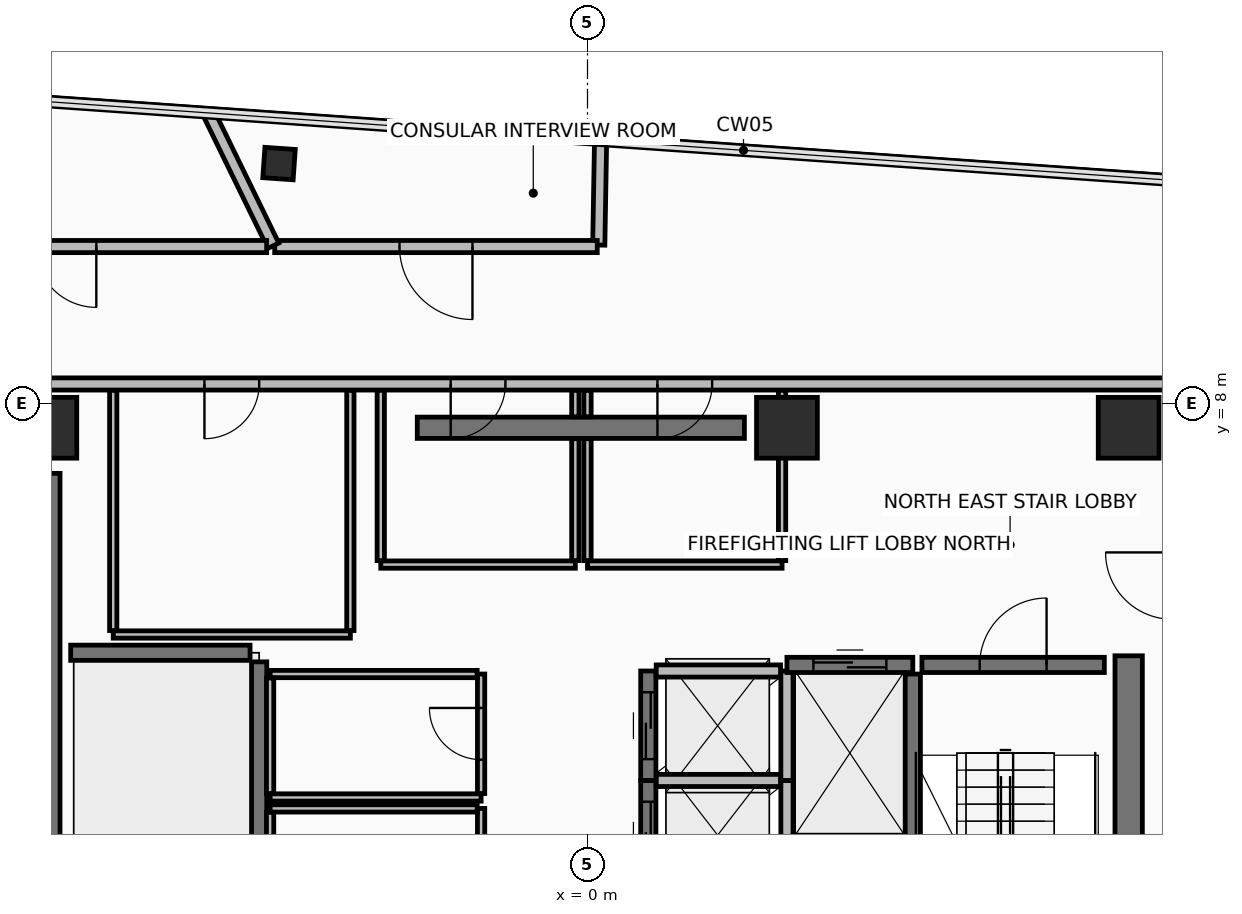
"""IFC4 building model, lengths in metres.
Left out: names, types, materials, properties, quantities, classifications, styles, units other than length and angle.
Written with IfcOpenShell. Run it as: python <this file> out.ifc"""

import sys

from ifc_helpers import new_model, si_unit, direction, frame, frame_2d, origin, origin_2d, place, context, subcontext, project, spatial, rectangle, hollow_rectangle, extrude, element, fill, save


model = new_model("IFC4")
c1 = context("Model", 3, precision=1e-05, world=origin(), true_north=direction((0.0, 1.0)))
c2 = subcontext(c1, "Body", "Model", "MODEL_VIEW")
j1 = project(units=[si_unit("LENGTHUNIT", "METRE"), si_unit("PLANEANGLEUNIT", "RADIAN")], contexts=[c1])
p1 = place(None, origin())
s1 = spatial("IfcSite", under=j1, at=p1, CompositionType="ELEMENT")
p2 = place(p1, origin())
s2 = spatial("IfcBuilding", under=s1, at=p2, CompositionType="ELEMENT")
p3 = place(p2, frame((0.0, 0.0, 227.05)))
s3 = spatial("IfcBuildingStorey", under=s2, at=p3, CompositionType="ELEMENT", Elevation=227.05)
for number, where, z_axis, x_axis in (
    (1, (8.9, 7.6, 0.0), (0.0, 0.0, 1.0), (1.0, 0.0, 0.0)),
    (2, (3.28, 7.6, 0.0), (0.0, 0.0, 1.0), (1.0, 0.0, 0.0)),
    (3, (-8.9, 7.6, 0.0), (0.0, 0.0, 1.0), (1.0, 0.0, 0.0)),
):
    element("IfcColumn", number, at=place(p3, frame(where, z_axis=z_axis, x_axis=x_axis)), inside=s3, PredefinedType="COLUMN", context=c2, shape_type="SweptSolid", body=[
        extrude(rectangle(XDim=1.0, YDim=1.0, at=origin_2d()), origin(), (0.0, 0.0, 1.0), 3.6),
    ])
p4 = place(p3, frame((-5.073, 11.945, 0.0), z_axis=(0.0, 0.0, 1.0), x_axis=(-0.99756405026, 0.069756473744, 0.0)))
e4 = element("IfcColumn", 4, at=p4, inside=s3, PredefinedType="COLUMN", context=c2, shape_type="SweptSolid", body=[
    extrude(hollow_rectangle(XDim=0.5, YDim=0.5, WallThickness=0.032, at=origin_2d()), origin(), (0.0, 0.0, 1.0), 3.6),
])
p5 = place(p3, frame((-2.8, 7.6, 0.0), z_axis=(0.0, 0.0, 1.0), x_axis=(1.0, 0.0, 0.0)))
e5 = element("IfcWall", 5, at=p5, inside=s3, PredefinedType="SHEAR", context=c2, shape_type="SweptSolid", body=[
    extrude(rectangle(XDim=5.38, YDim=0.35, at=frame_2d((2.69, 0.0))), origin(), (0.0, 0.0, 1.0), 3.42),
])
for number, where, z_axis, x_axis in (
    (6, (-8.9, -3.85, 0.0), (0.0, 0.0, 1.0), (0.0, 1.0, 0.0)),
    (7, (8.9, -6.85, 0.0), (0.0, 0.0, 1.0), (0.0, 1.0, 0.0)),
):
    element("IfcWall", number, at=place(p3, frame(where, z_axis=z_axis, x_axis=x_axis)), inside=s3, PredefinedType="SHEAR", context=c2, shape_type="SweptSolid", body=[
        extrude(rectangle(XDim=10.7, YDim=0.45, at=frame_2d((5.35, 0.0))), origin(), (0.0, 0.0, 1.0), 3.42),
    ])
p6 = place(p3, frame((9.62, 8.32, 0.0), z_axis=(0.0, 0.0, 1.0), x_axis=(-1.0, 0.0, 0.0)))
e8 = element("IfcWall", 8, at=p6, inside=s3, PredefinedType="PARTITIONING", context=c2, shape_type="SweptSolid", body=[
    extrude(rectangle(XDim=19.24, YDim=0.2, at=frame_2d((9.62, 0.0))), origin(), (0.0, 0.0, 1.0), 2.915),
])
p7 = place(p6, frame((10.97, 0.0, 0.0)))
e9 = element("IfcOpeningElement", 9, at=p7, cuts=e8, PredefinedType="OPENING", context=c2, shape_type="SweptSolid", body=[
    extrude(rectangle(XDim=0.9, YDim=2.1, at=frame_2d((0.45, 1.05))), frame((0.0, 0.11, 0.0), z_axis=(0.0, -1.0, 0.0), x_axis=(1.0, 0.0, 0.0)), (0.0, 0.0, 1.0), 0.22),
])
p8 = place(p6, frame((7.57, 0.0, 0.0)))
e10 = element("IfcOpeningElement", 10, at=p8, cuts=e8, PredefinedType="OPENING", context=c2, shape_type="SweptSolid", body=[
    extrude(rectangle(XDim=0.9, YDim=2.1, at=frame_2d((0.45, 1.05))), frame((0.0, 0.11, 0.0), z_axis=(0.0, -1.0, 0.0), x_axis=(1.0, 0.0, 0.0)), (0.0, 0.0, 1.0), 0.22),
])
p9 = place(p6, frame((15.02, 0.0, 0.0)))
e11 = element("IfcOpeningElement", 11, at=p9, cuts=e8, PredefinedType="OPENING", context=c2, shape_type="SweptSolid", body=[
    extrude(rectangle(XDim=0.9, YDim=2.1, at=frame_2d((0.45, 1.05))), frame((0.0, 0.11, 0.0), z_axis=(0.0, -1.0, 0.0), x_axis=(1.0, 0.0, 0.0)), (0.0, 0.0, 1.0), 0.22),
])
p10 = place(p3, frame((-5.4, -3.55, 0.0), z_axis=(0.0, 0.0, 1.0), x_axis=(0.0, 1.0, 0.0)))
e12 = element("IfcWall", 12, at=p10, inside=s3, PredefinedType="SHEAR", context=c2, shape_type="SweptSolid", body=[
    extrude(rectangle(XDim=7.3, YDim=0.25, at=frame_2d((3.65, 0.0))), origin(), (0.0, 0.0, 1.0), 3.42),
])
p11 = place(p3, frame((-8.5, 3.9, 0.0), z_axis=(0.0, 0.0, 1.0), x_axis=(1.0, 0.0, 0.0)))
e13 = element("IfcWall", 13, at=p11, inside=s3, PredefinedType="SHEAR", context=c2, shape_type="SweptSolid", body=[
    extrude(rectangle(XDim=2.95, YDim=0.25, at=frame_2d((1.475, 0.0))), origin(), (0.0, 0.0, 1.0), 3.42),
])
p12 = place(p3, frame((5.35, -3.75, 0.0), z_axis=(0.0, 0.0, 1.0), x_axis=(0.0, 1.0, 0.0)))
e14 = element("IfcWall", 14, at=p12, inside=s3, PredefinedType="SHEAR", context=c2, shape_type="SweptSolid", body=[
    extrude(rectangle(XDim=7.3, YDim=0.25, at=frame_2d((3.65, 0.0))), origin(), (0.0, 0.0, 1.0), 3.42),
])
p13 = place(p3, frame((5.5, 3.7, 0.0), z_axis=(0.0, 0.0, 1.0), x_axis=(1.0, 0.0, 0.0)))
e15 = element("IfcWall", 15, at=p13, inside=s3, PredefinedType="SHEAR", context=c2, shape_type="SweptSolid", body=[
    extrude(rectangle(XDim=3.0, YDim=0.25, at=frame_2d((1.5, 0.0))), origin(), (0.0, 0.0, 1.0), 3.42),
])
p14 = place(p13, frame((0.95, 0.0, 0.0)))
e16 = element("IfcOpeningElement", 16, at=p14, cuts=e15, PredefinedType="OPENING", context=c2, shape_type="SweptSolid", body=[
    extrude(rectangle(XDim=1.1, YDim=2.15, at=frame_2d((0.55, 1.075))), frame((0.0, 0.135, 0.0), z_axis=(0.0, -1.0, 0.0), x_axis=(1.0, 0.0, 0.0)), (0.0, 0.0, 1.0), 0.27),
])
p15 = place(p3, frame((1.0, 0.0, 0.0), z_axis=(0.0, 0.0, 1.0), x_axis=(0.0, 1.0, 0.0)))
e17 = element("IfcWall", 17, at=p15, inside=s3, PredefinedType="SHEAR", context=c2, shape_type="SweptSolid", body=[
    extrude(rectangle(XDim=1.8, YDim=0.25, at=frame_2d((0.9, 0.0))), origin(), (0.0, 0.0, 1.0), 3.42),
])
p16 = place(p15, frame((0.35, 0.0, 0.0)))
e18 = element("IfcOpeningElement", 18, at=p16, cuts=e17, PredefinedType="OPENING", context=c2, shape_type="SweptSolid", body=[
    extrude(rectangle(XDim=1.1, YDim=2.2, at=frame_2d((0.55, 1.1))), frame((0.0, 0.135, 0.0), z_axis=(0.0, -1.0, 0.0), x_axis=(1.0, 0.0, 0.0)), (0.0, 0.0, 1.0), 0.27),
])
p17 = place(p3, frame((3.28, 0.0, 0.0), z_axis=(0.0, 0.0, 1.0), x_axis=(0.0, 1.0, 0.0)))
e19 = element("IfcWall", 19, at=p17, inside=s3, PredefinedType="PARTITIONING", context=c2, shape_type="SweptSolid", body=[
    extrude(rectangle(XDim=1.8, YDim=0.2, at=frame_2d((0.9, 0.0))), origin(), (0.0, 0.0, 1.0), 3.42),
])
p18 = place(p3, frame((1.13, 1.8, 0.0), z_axis=(0.0, 0.0, 1.0), x_axis=(1.0, 0.0, 0.0)))
e20 = element("IfcWall", 20, at=p18, inside=s3, PredefinedType="PARTITIONING", context=c2, shape_type="SweptSolid", body=[
    extrude(rectangle(XDim=2.045, YDim=0.2, at=frame_2d((1.022, 0.0))), origin(), (0.0, 0.0, 1.0), 3.42),
])
p19 = place(p3, frame((1.0, 1.8, 0.0), z_axis=(0.0, 0.0, 1.0), x_axis=(0.0, 1.0, 0.0)))
e21 = element("IfcWall", 21, at=p19, inside=s3, PredefinedType="SHEAR", context=c2, shape_type="SweptSolid", body=[
    extrude(rectangle(XDim=1.8, YDim=0.25, at=frame_2d((0.9, 0.0))), origin(), (0.0, 0.0, 1.0), 3.42),
])
p20 = place(p19, frame((0.35, 0.0, 0.0)))
e22 = element("IfcOpeningElement", 22, at=p20, cuts=e21, PredefinedType="OPENING", context=c2, shape_type="SweptSolid", body=[
    extrude(rectangle(XDim=1.1, YDim=2.2, at=frame_2d((0.55, 1.1))), frame((0.0, 0.135, 0.0), z_axis=(0.0, -1.0, 0.0), x_axis=(1.0, 0.0, 0.0)), (0.0, 0.0, 1.0), 0.27),
])
p21 = place(p3, frame((3.28, 1.8, 0.0), z_axis=(0.0, 0.0, 1.0), x_axis=(0.0, 1.0, 0.0)))
e23 = element("IfcWall", 23, at=p21, inside=s3, PredefinedType="PARTITIONING", context=c2, shape_type="SweptSolid", body=[
    extrude(rectangle(XDim=1.8, YDim=0.2, at=frame_2d((0.9, 0.0))), origin(), (0.0, 0.0, 1.0), 3.42),
])
p22 = place(p3, frame((1.13, 3.6, 0.0), z_axis=(0.0, 0.0, 1.0), x_axis=(1.0, 0.0, 0.0)))
e24 = element("IfcWall", 24, at=p22, inside=s3, PredefinedType="PARTITIONING", context=c2, shape_type="SweptSolid", body=[
    extrude(rectangle(XDim=2.045, YDim=0.2, at=frame_2d((1.022, 0.0))), origin(), (0.0, 0.0, 1.0), 2.715),
])
p23 = place(p3, frame((3.28, 3.7, 0.0), z_axis=(0.0, 0.0, 1.0), x_axis=(1.0, 0.0, 0.0)))
e25 = element("IfcWall", 25, at=p23, inside=s3, PredefinedType="SHEAR", context=c2, shape_type="SweptSolid", body=[
    extrude(rectangle(XDim=2.07, YDim=0.25, at=frame_2d((1.035, 0.0))), origin(), (0.0, 0.0, 1.0), 3.42),
])
p24 = place(p23, frame((0.435, 0.0, 0.0)))
e26 = element("IfcOpeningElement", 26, at=p24, cuts=e25, PredefinedType="OPENING", context=c2, shape_type="SweptSolid", body=[
    extrude(rectangle(XDim=1.2, YDim=2.2, at=frame_2d((0.6, 1.1))), frame((0.0, 0.135, 0.0), z_axis=(0.0, -1.0, 0.0), x_axis=(1.0, 0.0, 0.0)), (0.0, 0.0, 1.0), 0.27),
])
p25 = place(p3, frame((-5.22, 1.52, 0.0), z_axis=(0.0, 0.0, 1.0), x_axis=(1.0, 0.0, 0.0)))
e27 = element("IfcWall", 27, at=p25, inside=s3, PredefinedType="PARTITIONING", context=c2, shape_type="SweptSolid", body=[
    extrude(rectangle(XDim=3.47, YDim=0.12, at=frame_2d((1.735, 0.0))), origin(), (0.0, 0.0, 1.0), 3.42),
])
p26 = place(p3, frame((-1.75, 1.585, 0.0), z_axis=(0.0, 0.0, 1.0), x_axis=(0.0, 1.0, 0.0)))
e28 = element("IfcWall", 28, at=p26, inside=s3, PredefinedType="PARTITIONING", context=c2, shape_type="SweptSolid", body=[
    extrude(rectangle(XDim=1.965, YDim=0.12, at=frame_2d((0.982, 0.0))), origin(), (0.0, 0.0, 1.0), 3.42),
])
p27 = place(p26, frame((0.557, 0.0, 0.0)))
e29 = element("IfcOpeningElement", 29, at=p27, cuts=e28, PredefinedType="OPENING", context=c2, shape_type="SweptSolid", body=[
    extrude(rectangle(XDim=0.85, YDim=2.1, at=frame_2d((0.425, 1.05))), frame((0.0, 0.07, 0.0), z_axis=(0.0, -1.0, 0.0), x_axis=(1.0, 0.0, 0.0)), (0.0, 0.0, 1.0), 0.14),
])
p28 = place(p3, frame((-1.815, 3.55, 0.0), z_axis=(0.0, 0.0, 1.0), x_axis=(-1.0, 0.0, 0.0)))
e30 = element("IfcWall", 30, at=p28, inside=s3, PredefinedType="PARTITIONING", context=c2, shape_type="SweptSolid", body=[
    extrude(rectangle(XDim=3.405, YDim=0.12, at=frame_2d((1.703, 0.0))), origin(), (0.0, 0.0, 1.0), 3.42),
])
p29 = place(p3, frame((-5.22, 3.485, 0.0), z_axis=(0.0, 0.0, 1.0), x_axis=(0.0, -1.0, 0.0)))
e31 = element("IfcWall", 31, at=p29, inside=s3, PredefinedType="PARTITIONING", context=c2, shape_type="SweptSolid", body=[
    extrude(rectangle(XDim=1.9, YDim=0.12, at=frame_2d((0.95, 0.0))), origin(), (0.0, 0.0, 1.0), 3.42),
])
p30 = place(p3, frame((-1.75, -0.485, 0.0), z_axis=(0.0, 0.0, 1.0), x_axis=(0.0, 1.0, 0.0)))
e32 = element("IfcWall", 32, at=p30, inside=s3, PredefinedType="PARTITIONING", context=c2, shape_type="SweptSolid", body=[
    extrude(rectangle(XDim=1.825, YDim=0.12, at=frame_2d((0.913, 0.0))), origin(), (0.0, 0.0, 1.0), 3.42),
])
p31 = place(p30, frame((0.488, 0.0, 0.0)))
e33 = element("IfcOpeningElement", 33, at=p31, cuts=e32, PredefinedType="OPENING", context=c2, shape_type="SweptSolid", body=[
    extrude(rectangle(XDim=0.85, YDim=2.1, at=frame_2d((0.425, 1.05))), frame((0.0, 0.07, 0.0), z_axis=(0.0, -1.0, 0.0), x_axis=(1.0, 0.0, 0.0)), (0.0, 0.0, 1.0), 0.14),
])
p32 = place(p3, frame((-1.815, 1.34, 0.0), z_axis=(0.0, 0.0, 1.0), x_axis=(-1.0, 0.0, 0.0)))
e34 = element("IfcWall", 34, at=p32, inside=s3, PredefinedType="PARTITIONING", context=c2, shape_type="SweptSolid", body=[
    extrude(rectangle(XDim=3.405, YDim=0.12, at=frame_2d((1.703, 0.0))), origin(), (0.0, 0.0, 1.0), 3.42),
])
p33 = place(p3, frame((-5.22, 1.275, 0.0), z_axis=(0.0, 0.0, 1.0), x_axis=(0.0, -1.0, 0.0)))
e35 = element("IfcWall", 35, at=p33, inside=s3, PredefinedType="PARTITIONING", context=c2, shape_type="SweptSolid", body=[
    extrude(rectangle(XDim=1.76, YDim=0.12, at=frame_2d((0.88, 0.0))), origin(), (0.0, 0.0, 1.0), 3.42),
])
p34 = place(p3, frame((-3.4, 5.35, 0.0), z_axis=(0.0, 0.0, 1.0), x_axis=(1.0, 0.0, 0.0)))
e36 = element("IfcWall", 36, at=p34, inside=s3, PredefinedType="PARTITIONING", context=c2, shape_type="SweptSolid", body=[
    extrude(rectangle(XDim=3.2, YDim=0.12, at=frame_2d((1.6, 0.0))), origin(), (0.0, 0.0, 1.0), 3.42),
])
p35 = place(p3, frame((-0.2, 5.415, 0.0), z_axis=(0.0, 0.0, 1.0), x_axis=(0.0, 1.0, 0.0)))
e37 = element("IfcWall", 37, at=p35, inside=s3, PredefinedType="PARTITIONING", context=c2, shape_type="SweptSolid", body=[
    extrude(rectangle(XDim=2.005, YDim=0.12, at=frame_2d((1.002, 0.0))), origin(), (0.0, 0.0, 1.0), 2.715),
])
p36 = place(p3, frame((-0.2, 7.78, 0.0), z_axis=(0.0, 0.0, 1.0), x_axis=(0.0, 1.0, 0.0)))
e38 = element("IfcWall", 38, at=p36, inside=s3, PredefinedType="PARTITIONING", context=c2, shape_type="SweptSolid", body=[
    extrude(rectangle(XDim=0.435, YDim=0.12, at=frame_2d((0.218, 0.0))), origin(), (0.0, 0.0, 1.0), 2.715),
])
p37 = place(p3, frame((-3.4, 8.215, 0.0), z_axis=(0.0, 0.0, 1.0), x_axis=(0.0, -1.0, 0.0)))
e39 = element("IfcWall", 39, at=p37, inside=s3, PredefinedType="PARTITIONING", context=c2, shape_type="SweptSolid", body=[
    extrude(rectangle(XDim=2.8, YDim=0.12, at=frame_2d((1.4, 0.0))), origin(), (0.0, 0.0, 1.0), 2.715),
])
p38 = place(p3, frame((0.0, 5.35, 0.0), z_axis=(0.0, 0.0, 1.0), x_axis=(1.0, 0.0, 0.0)))
e40 = element("IfcWall", 40, at=p38, inside=s3, PredefinedType="PARTITIONING", context=c2, shape_type="SweptSolid", body=[
    extrude(rectangle(XDim=3.2, YDim=0.12, at=frame_2d((1.6, 0.0))), origin(), (0.0, 0.0, 1.0), 2.715),
])
p39 = place(p3, frame((3.2, 5.415, 0.0), z_axis=(0.0, 0.0, 1.0), x_axis=(0.0, 1.0, 0.0)))
e41 = element("IfcWall", 41, at=p39, inside=s3, PredefinedType="PARTITIONING", context=c2, shape_type="SweptSolid", body=[
    extrude(rectangle(XDim=2.8, YDim=0.12, at=frame_2d((1.4, 0.0))), origin(), (0.0, 0.0, 1.0), 2.715),
])
p40 = place(p3, frame((0.0, 8.215, 0.0), z_axis=(0.0, 0.0, 1.0), x_axis=(0.0, -1.0, 0.0)))
e42 = element("IfcWall", 42, at=p40, inside=s3, PredefinedType="PARTITIONING", context=c2, shape_type="SweptSolid", body=[
    extrude(rectangle(XDim=0.435, YDim=0.12, at=frame_2d((0.218, 0.0))), origin(), (0.0, 0.0, 1.0), 2.715),
])
p41 = place(p3, frame((0.0, 7.42, 0.0), z_axis=(0.0, 0.0, 1.0), x_axis=(0.0, -1.0, 0.0)))
e43 = element("IfcWall", 43, at=p41, inside=s3, PredefinedType="PARTITIONING", context=c2, shape_type="SweptSolid", body=[
    extrude(rectangle(XDim=2.005, YDim=0.12, at=frame_2d((1.002, 0.0))), origin(), (0.0, 0.0, 1.0), 2.715),
])
p42 = place(p3, frame((-7.8, 4.2, 0.0), z_axis=(0.0, 0.0, 1.0), x_axis=(1.0, 0.0, 0.0)))
e44 = element("IfcWall", 44, at=p42, inside=s3, PredefinedType="PARTITIONING", context=c2, shape_type="SweptSolid", body=[
    extrude(rectangle(XDim=3.9, YDim=0.12, at=frame_2d((1.95, 0.0))), origin(), (0.0, 0.0, 1.0), 3.42),
])
for number, where, z_axis, x_axis in (
    (45, (-3.9, 4.265, 0.0), (0.0, 0.0, 1.0), (0.0, 1.0, 0.0)),
    (46, (-7.8, 8.215, 0.0), (0.0, 0.0, 1.0), (0.0, -1.0, 0.0)),
):
    element("IfcWall", number, at=place(p3, frame(where, z_axis=z_axis, x_axis=x_axis)), inside=s3, PredefinedType="PARTITIONING", context=c2, shape_type="SweptSolid", body=[
        extrude(rectangle(XDim=3.95, YDim=0.12, at=frame_2d((1.975, 0.0))), origin(), (0.0, 0.0, 1.0), 2.715),
    ])
p43 = place(p3, frame((0.215, 12.303, 0.0), z_axis=(0.0, 0.0, 1.0), x_axis=(-0.017389924227, -0.999848783835, 0.0)))
e47 = element("IfcWall", 47, at=p43, inside=s3, PredefinedType="PARTITIONING", context=c2, shape_type="SweptSolid", body=[
    extrude(rectangle(XDim=1.699, YDim=0.2, at=frame_2d((0.849, 0.0))), origin(), (0.0, 0.0, 1.0), 2.765),
])
p44 = place(p3, frame((0.16, 10.58, 0.0), z_axis=(0.0, 0.0, 1.0), x_axis=(-1.0, 0.0, 0.0)))
e48 = element("IfcWall", 48, at=p44, inside=s3, PredefinedType="PARTITIONING", context=c2, shape_type="SweptSolid", body=[
    extrude(rectangle(XDim=5.305, YDim=0.2, at=frame_2d((2.652, 0.0))), origin(), (0.0, 0.0, 1.0), 3.42),
])
p45 = place(p44, frame((2.052, 0.0, 0.0)))
e49 = element("IfcOpeningElement", 49, at=p45, cuts=e48, PredefinedType="OPENING", context=c2, shape_type="SweptSolid", body=[
    extrude(rectangle(XDim=1.2, YDim=2.15, at=frame_2d((0.6, 1.075))), frame((0.0, 0.11, 0.0), z_axis=(0.0, -1.0, 0.0), x_axis=(1.0, 0.0, 0.0)), (0.0, 0.0, 1.0), 0.22),
])
p46 = place(p3, frame((-5.167, 10.594, 0.0), z_axis=(0.0, 0.0, 1.0), x_axis=(-0.43834839389, 0.898805143273, 0.0)))
e50 = element("IfcWall", 50, at=p46, inside=s3, PredefinedType="PARTITIONING", context=c2, shape_type="SweptSolid", body=[
    extrude(rectangle(XDim=2.429, YDim=0.2, at=frame_2d((1.215, 0.0))), origin(), (0.0, 0.0, 1.0), 2.765),
])
p47 = place(p3, frame((-5.277, 10.58, 0.0), z_axis=(0.0, 0.0, 1.0), x_axis=(-1.0, 0.0, 0.0)))
e51 = element("IfcWall", 51, at=p47, inside=s3, PredefinedType="PARTITIONING", context=c2, shape_type="SweptSolid", body=[
    extrude(rectangle(XDim=6.602, YDim=0.2, at=frame_2d((3.301, 0.0))), origin(), (0.0, 0.0, 1.0), 2.915),
])
p48 = place(p47, frame((2.801, 0.0, 0.0)))
e52 = element("IfcOpeningElement", 52, at=p48, cuts=e51, PredefinedType="OPENING", context=c2, shape_type="SweptSolid", body=[
    extrude(rectangle(XDim=1.0, YDim=2.15, at=frame_2d((0.5, 1.075))), frame((0.0, 0.11, 0.0), z_axis=(0.0, -1.0, 0.0), x_axis=(1.0, 0.0, 0.0)), (0.0, 0.0, 1.0), 0.22),
])
p49 = place(p14, frame((1.1, 0.0, 0.0), z_axis=(0.0, 0.0, 1.0), x_axis=(-1.0, 0.0, 0.0)))
e53 = element("IfcDoor", 53, at=p49, inside=s3, OperationType="SINGLE_SWING_LEFT", PredefinedType="DOOR", context=c2, shape_type="SweptSolid", body=[
    extrude(rectangle(XDim=1.1, YDim=2.15, at=frame_2d((0.55, 1.075))), frame((0.0, 0.025, 0.0), z_axis=(0.0, -1.0, 0.0), x_axis=(1.0, 0.0, 0.0)), (0.0, 0.0, 1.0), 0.05),
])
fill(e16, e53)
p50 = place(p16, origin())
e54 = element("IfcDoor", 54, at=p50, inside=s3, OperationType="SLIDING_TO_LEFT", PredefinedType="DOOR", context=c2, shape_type="SweptSolid", body=[
    extrude(rectangle(XDim=1.1, YDim=2.2, at=frame_2d((0.55, 1.1))), frame((0.0, 0.025, 0.0), z_axis=(0.0, -1.0, 0.0), x_axis=(1.0, 0.0, 0.0)), (0.0, 0.0, 1.0), 0.05),
])
fill(e18, e54)
p51 = place(p20, origin())
e55 = element("IfcDoor", 55, at=p51, inside=s3, OperationType="SLIDING_TO_LEFT", PredefinedType="DOOR", context=c2, shape_type="SweptSolid", body=[
    extrude(rectangle(XDim=1.1, YDim=2.2, at=frame_2d((0.55, 1.1))), frame((0.0, 0.025, 0.0), z_axis=(0.0, -1.0, 0.0), x_axis=(1.0, 0.0, 0.0)), (0.0, 0.0, 1.0), 0.05),
])
fill(e22, e55)
p52 = place(p24, origin())
e56 = element("IfcDoor", 56, at=p52, inside=s3, OperationType="SLIDING_TO_RIGHT", PredefinedType="DOOR", context=c2, shape_type="SweptSolid", body=[
    extrude(rectangle(XDim=1.2, YDim=2.2, at=frame_2d((0.6, 1.1))), frame((0.0, 0.025, 0.0), z_axis=(0.0, -1.0, 0.0), x_axis=(1.0, 0.0, 0.0)), (0.0, 0.0, 1.0), 0.05),
])
fill(e26, e56)
p53 = place(p27, frame((0.85, 0.0, 0.0), z_axis=(0.0, 0.0, 1.0), x_axis=(-1.0, 0.0, 0.0)))
e57 = element("IfcDoor", 57, at=p53, inside=s3, OperationType="SINGLE_SWING_RIGHT", PredefinedType="DOOR", context=c2, shape_type="SweptSolid", body=[
    extrude(rectangle(XDim=0.85, YDim=2.1, at=frame_2d((0.425, 1.05))), frame((0.0, 0.025, 0.0), z_axis=(0.0, -1.0, 0.0), x_axis=(1.0, 0.0, 0.0)), (0.0, 0.0, 1.0), 0.05),
])
fill(e29, e57)
p54 = place(p7, frame((0.9, 0.0, 0.0), z_axis=(0.0, 0.0, 1.0), x_axis=(-1.0, 0.0, 0.0)))
e58 = element("IfcDoor", 58, at=p54, inside=s3, OperationType="SINGLE_SWING_LEFT", PredefinedType="DOOR", context=c2, shape_type="SweptSolid", body=[
    extrude(rectangle(XDim=0.9, YDim=2.1, at=frame_2d((0.45, 1.05))), frame((0.0, 0.025, 0.0), z_axis=(0.0, -1.0, 0.0), x_axis=(1.0, 0.0, 0.0)), (0.0, 0.0, 1.0), 0.05),
])
fill(e9, e58)
p55 = place(p8, frame((0.9, 0.0, 0.0), z_axis=(0.0, 0.0, 1.0), x_axis=(-1.0, 0.0, 0.0)))
e59 = element("IfcDoor", 59, at=p55, inside=s3, OperationType="SINGLE_SWING_LEFT", PredefinedType="DOOR", context=c2, shape_type="SweptSolid", body=[
    extrude(rectangle(XDim=0.9, YDim=2.1, at=frame_2d((0.45, 1.05))), frame((0.0, 0.025, 0.0), z_axis=(0.0, -1.0, 0.0), x_axis=(1.0, 0.0, 0.0)), (0.0, 0.0, 1.0), 0.05),
])
fill(e10, e59)
p56 = place(p9, frame((0.9, 0.0, 0.0), z_axis=(0.0, 0.0, 1.0), x_axis=(-1.0, 0.0, 0.0)))
e60 = element("IfcDoor", 60, at=p56, inside=s3, OperationType="SINGLE_SWING_LEFT", PredefinedType="DOOR", context=c2, shape_type="SweptSolid", body=[
    extrude(rectangle(XDim=0.9, YDim=2.1, at=frame_2d((0.45, 1.05))), frame((0.0, 0.025, 0.0), z_axis=(0.0, -1.0, 0.0), x_axis=(1.0, 0.0, 0.0)), (0.0, 0.0, 1.0), 0.05),
])
fill(e11, e60)
p57 = place(p45, origin())
e61 = element("IfcDoor", 61, at=p57, inside=s3, OperationType="SINGLE_SWING_LEFT", PredefinedType="DOOR", context=c2, shape_type="SweptSolid", body=[
    extrude(rectangle(XDim=1.2, YDim=2.15, at=frame_2d((0.6, 1.075))), frame((0.0, 0.025, 0.0), z_axis=(0.0, -1.0, 0.0), x_axis=(1.0, 0.0, 0.0)), (0.0, 0.0, 1.0), 0.05),
])
fill(e49, e61)
p58 = place(p48, origin())
e62 = element("IfcDoor", 62, at=p58, inside=s3, OperationType="SINGLE_SWING_RIGHT", PredefinedType="DOOR", context=c2, shape_type="SweptSolid", body=[
    extrude(rectangle(XDim=1.0, YDim=2.15, at=frame_2d((0.5, 1.075))), frame((0.0, 0.025, 0.0), z_axis=(0.0, -1.0, 0.0), x_axis=(1.0, 0.0, 0.0)), (0.0, 0.0, 1.0), 0.05),
])
fill(e52, e62)
save(model, sys.argv[1])
